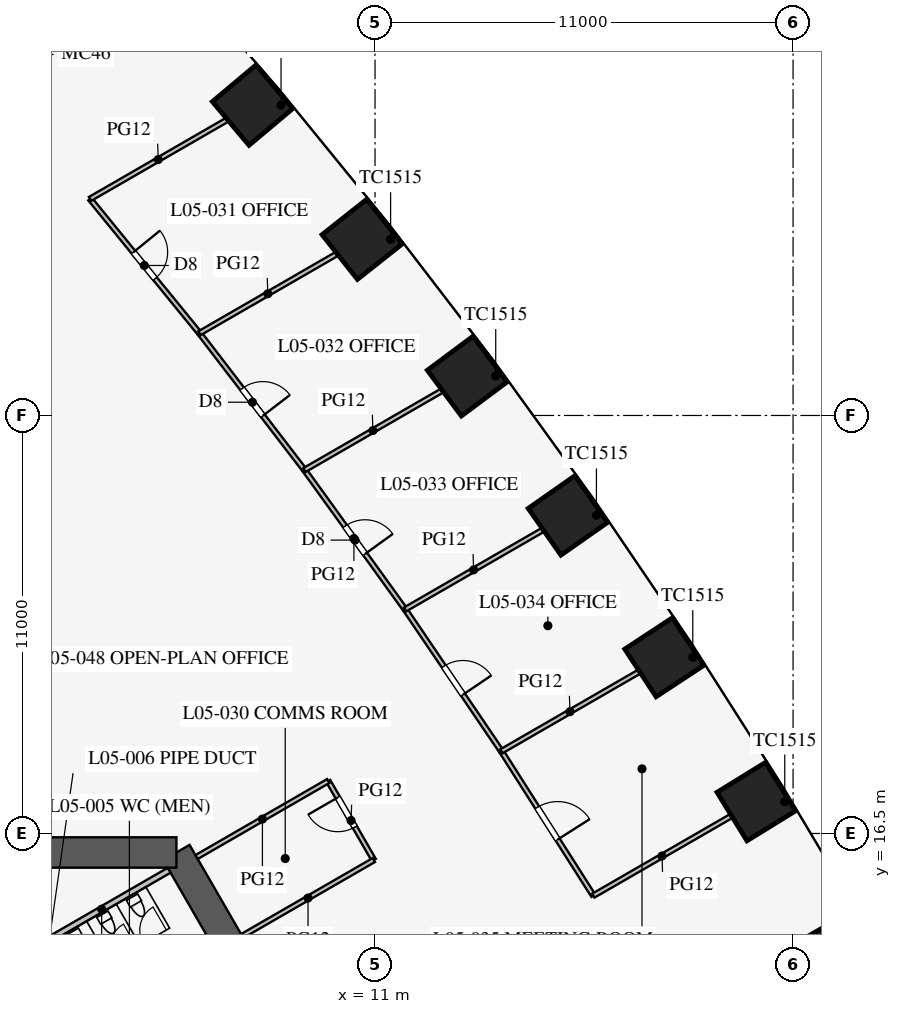
"""IFC4 building model, lengths in metres.
Left out: names, types, materials, properties, quantities, classifications, styles, units other than length and angle.
Written with IfcOpenShell. Run it as: python <this file> out.ifc"""

import sys

from ifc_helpers import new_model, si_unit, direction, frame, frame_2d, origin, origin_2d, place, context, subcontext, project, spatial, rectangle, extrude, element, fill, save


model = new_model("IFC4")
c1 = context("Model", 3, precision=1e-05, world=origin(), true_north=direction((0.0, 1.0)))
c2 = subcontext(c1, "Body", "Model", "MODEL_VIEW")
j1 = project(units=[si_unit("LENGTHUNIT", "METRE"), si_unit("PLANEANGLEUNIT", "RADIAN")], contexts=[c1])
p1 = place(None, origin())
s1 = spatial("IfcSite", under=j1, at=p1, CompositionType="ELEMENT")
p2 = place(p1, origin())
s2 = spatial("IfcBuilding", under=s1, at=p2, CompositionType="ELEMENT")
p3 = place(p2, frame((0.0, 0.0, 24.9)))
s3 = spatial("IfcBuildingStorey", under=s2, at=p3, CompositionType="ELEMENT", Elevation=24.9)
for number, where, z_axis, x_axis in (
    (1, (23.338, 13.474, 0.0), (0.0, 0.0, 1.0), (-0.5, 0.866, 0.0)),
    (2, (21.031, 17.339, 0.0), (0.0, 0.0, 1.0), (-0.525, 0.851, 0.0)),
    (3, (18.611, 21.137, 0.0), (0.0, 0.0, 1.0), (-0.549, 0.836, 0.0)),
    (4, (16.076, 24.87, 0.0), (0.0, 0.0, 1.0), (-0.574, 0.819, 0.0)),
    (5, (13.426, 28.536, 0.0), (0.0, 0.0, 1.0), (-0.597, 0.802, 0.0)),
    (6, (10.66, 32.135, 0.0), (0.0, 0.0, 1.0), (-0.62, 0.784, 0.0)),
    (7, (7.776, 35.667, 0.0), (0.0, 0.0, 1.0), (-0.643, 0.766, 0.0)),
):
    element("IfcColumn", number, at=place(p3, frame(where, z_axis=z_axis, x_axis=x_axis)), inside=s3, PredefinedType="COLUMN", context=c2, shape_type="SweptSolid", body=[
        extrude(rectangle(XDim=1.5, YDim=1.5, at=origin_2d()), origin(), (0.0, 0.0, 1.0), 4.2),
    ])
p4 = place(p3, frame((16.743, -3.0, 0.0), z_axis=(0.0, 0.0, 1.0), x_axis=(-0.500002442456, 0.866023993627, 0.0)))
e8 = element("IfcWall", 8, at=p4, inside=s3, PredefinedType="SHEAR", context=c2, shape_type="SweptSolid", body=[
    extrude(rectangle(XDim=21.939, YDim=0.8, at=frame_2d((10.97, 0.0))), origin(), (0.0, 0.0, 1.0), 4.2),
])
p5 = place(p4, frame((17.27, 0.0, 0.0)))
e9 = element("IfcOpeningElement", 9, at=p5, cuts=e8, PredefinedType="OPENING", context=c2, shape_type="SweptSolid", body=[
    extrude(rectangle(XDim=1.2, YDim=2.1, at=frame_2d((0.6, 1.05))), frame((0.0, 0.41, 0.0), z_axis=(0.0, -1.0, 0.0), x_axis=(1.0, 0.0, 0.0)), (0.0, 0.0, 1.0), 0.82),
])
p6 = place(p4, frame((3.47, 0.0, 0.0)))
e10 = element("IfcOpeningElement", 10, at=p6, cuts=e8, PredefinedType="OPENING", context=c2, shape_type="SweptSolid", body=[
    extrude(rectangle(XDim=1.2, YDim=2.1, at=frame_2d((0.6, 1.05))), frame((0.0, 0.41, 0.0), z_axis=(0.0, -1.0, 0.0), x_axis=(1.0, 0.0, 0.0)), (0.0, 0.0, 1.0), 0.82),
])
p7 = place(p3, frame((5.773, 16.0, 0.0), z_axis=(0.0, 0.0, 1.0), x_axis=(-1.0, 0.0, 0.0)))
e11 = element("IfcWall", 11, at=p7, inside=s3, PredefinedType="SHEAR", context=c2, shape_type="SweptSolid", body=[
    extrude(rectangle(XDim=11.547, YDim=0.8, at=frame_2d((5.773, 0.0))), origin(), (0.0, 0.0, 1.0), 4.2),
])
p8 = place(p3, frame((2.031, 13.482, 0.0), z_axis=(0.0, 0.0, 1.0), x_axis=(0.866050731258, 0.499956128963, 0.0)))
e12 = element("IfcWall", 12, at=p8, inside=s3, PredefinedType="PARTITIONING", context=c2, shape_type="SweptSolid", body=[
    extrude(rectangle(XDim=4.1, YDim=0.15, at=frame_2d((2.05, 0.0))), origin(), (0.0, 0.0, 1.0), 4.0),
])
p9 = place(p3, frame((10.969, 15.802, 0.0), z_axis=(0.0, 0.0, 1.0), x_axis=(-0.500001309137, 0.866024647952, 0.0)))
e13 = element("IfcWall", 13, at=p9, inside=s3, PredefinedType="PARTITIONING", context=c2, shape_type="SweptSolid", body=[
    extrude(rectangle(XDim=2.4, YDim=0.12, at=frame_2d((1.2, 0.0))), origin(), (0.0, 0.0, 1.0), 2.9),
])
p10 = place(p9, frame((1.0, 0.0, 0.15)))
e14 = element("IfcOpeningElement", 14, at=p10, cuts=e13, PredefinedType="OPENING", context=c2, shape_type="SweptSolid", body=[
    extrude(rectangle(XDim=0.9, YDim=2.1, at=frame_2d((0.45, 1.05))), frame((0.0, 0.07, 0.0), z_axis=(0.0, -1.0, 0.0), x_axis=(1.0, 0.0, 0.0)), (0.0, 0.0, 1.0), 0.14),
])
for number, where, z_axis, x_axis in (
    (15, (6.305, 15.88, 0.0), (0.0, 0.0, 1.0), (0.866, 0.5, 0.0)),
    (16, (7.505, 13.802, 0.0), (0.0, 0.0, 1.0), (0.866, 0.5, 0.0)),
):
    element("IfcWall", number, at=place(p3, frame(where, z_axis=z_axis, x_axis=x_axis)), inside=s3, PredefinedType="PARTITIONING", context=c2, shape_type="SweptSolid", body=[
        extrude(rectangle(XDim=4.0, YDim=0.12, at=frame_2d((2.0, 0.0))), origin(), (0.0, 0.0, 1.0), 2.9),
    ])
p11 = place(p3, frame((11.792, 22.396, 0.0), z_axis=(0.0, 0.0, 1.0), x_axis=(-0.585376255171, 0.810761765183, 0.0)))
e17 = element("IfcWall", 17, at=p11, inside=s3, PredefinedType="PARTITIONING", context=c2, shape_type="SweptSolid", body=[
    extrude(rectangle(XDim=4.523, YDim=0.12, at=frame_2d((2.262, 0.0))), origin(), (0.0, 0.0, 1.0), 2.9),
])
p12 = place(p11, frame((1.8, 0.0, 0.15)))
e18 = element("IfcOpeningElement", 18, at=p12, cuts=e17, PredefinedType="OPENING", context=c2, shape_type="SweptSolid", body=[
    extrude(rectangle(XDim=0.9, YDim=2.1, at=frame_2d((0.45, 1.05))), frame((0.0, 0.07, 0.0), z_axis=(0.0, -1.0, 0.0), x_axis=(1.0, 0.0, 0.0)), (0.0, 0.0, 1.0), 0.14),
])
p13 = place(p3, frame((9.144, 26.064, 0.0), z_axis=(0.0, 0.0, 1.0), x_axis=(-0.608818785139, 0.79330932609, 0.0)))
e19 = element("IfcWall", 19, at=p13, inside=s3, PredefinedType="PARTITIONING", context=c2, shape_type="SweptSolid", body=[
    extrude(rectangle(XDim=4.539, YDim=0.12, at=frame_2d((2.27, 0.0))), origin(), (0.0, 0.0, 1.0), 2.9),
])
p14 = place(p13, frame((1.8, 0.0, 0.15)))
e20 = element("IfcOpeningElement", 20, at=p14, cuts=e19, PredefinedType="OPENING", context=c2, shape_type="SweptSolid", body=[
    extrude(rectangle(XDim=0.9, YDim=2.1, at=frame_2d((0.45, 1.05))), frame((0.0, 0.07, 0.0), z_axis=(0.0, -1.0, 0.0), x_axis=(1.0, 0.0, 0.0)), (0.0, 0.0, 1.0), 0.14),
])
p15 = place(p3, frame((6.38, 29.665, 0.0), z_axis=(0.0, 0.0, 1.0), x_axis=(-0.631801700012, 0.775130061256, 0.0)))
e21 = element("IfcWall", 21, at=p15, inside=s3, PredefinedType="PARTITIONING", context=c2, shape_type="SweptSolid", body=[
    extrude(rectangle(XDim=4.558, YDim=0.12, at=frame_2d((2.279, 0.0))), origin(), (0.0, 0.0, 1.0), 2.9),
])
p16 = place(p15, frame((1.85, 0.0, 0.15)))
e22 = element("IfcOpeningElement", 22, at=p16, cuts=e21, PredefinedType="OPENING", context=c2, shape_type="SweptSolid", body=[
    extrude(rectangle(XDim=0.9, YDim=2.1, at=frame_2d((0.45, 1.05))), frame((0.0, 0.07, 0.0), z_axis=(0.0, -1.0, 0.0), x_axis=(1.0, 0.0, 0.0)), (0.0, 0.0, 1.0), 0.14),
])
p17 = place(p3, frame((16.745, 14.864, 0.0), z_axis=(0.0, 0.0, 1.0), x_axis=(-0.537205132487, 0.843451626135, 0.0)))
e23 = element("IfcWall", 23, at=p17, inside=s3, PredefinedType="PARTITIONING", context=c2, shape_type="SweptSolid", body=[
    extrude(rectangle(XDim=4.504, YDim=0.12, at=frame_2d((2.252, 0.0))), origin(), (0.0, 0.0, 1.0), 2.9),
])
p18 = place(p17, frame((1.75, 0.0, 0.15)))
e24 = element("IfcOpeningElement", 24, at=p18, cuts=e23, PredefinedType="OPENING", context=c2, shape_type="SweptSolid", body=[
    extrude(rectangle(XDim=1.0, YDim=2.1, at=frame_2d((0.5, 1.05))), frame((0.0, 0.07, 0.0), z_axis=(0.0, -1.0, 0.0), x_axis=(1.0, 0.0, 0.0)), (0.0, 0.0, 1.0), 0.14),
])
p19 = place(p3, frame((14.325, 18.663, 0.0), z_axis=(0.0, 0.0, 1.0), x_axis=(-0.561512004239, 0.827468591002, 0.0)))
e25 = element("IfcWall", 25, at=p19, inside=s3, PredefinedType="PARTITIONING", context=c2, shape_type="SweptSolid", body=[
    extrude(rectangle(XDim=4.512, YDim=0.12, at=frame_2d((2.256, 0.0))), origin(), (0.0, 0.0, 1.0), 2.9),
])
p20 = place(p19, frame((1.8, 0.0, 0.15)))
e26 = element("IfcOpeningElement", 26, at=p20, cuts=e25, PredefinedType="OPENING", context=c2, shape_type="SweptSolid", body=[
    extrude(rectangle(XDim=0.9, YDim=2.1, at=frame_2d((0.45, 1.05))), frame((0.0, 0.07, 0.0), z_axis=(0.0, -1.0, 0.0), x_axis=(1.0, 0.0, 0.0)), (0.0, 0.0, 1.0), 0.14),
])
p21 = place(p3, frame((11.792, 22.396, 0.0), z_axis=(0.0, 0.0, 1.0), x_axis=(0.866011781705, 0.500023593391, 0.0)))
e27 = element("IfcWall", 27, at=p21, inside=s3, PredefinedType="PARTITIONING", context=c2, shape_type="SweptSolid", body=[
    extrude(rectangle(XDim=4.164, YDim=0.12, at=frame_2d((2.082, 0.0))), origin(), (0.0, 0.0, 1.0), 2.9),
])
p22 = place(p3, frame((9.144, 26.064, 0.0), z_axis=(0.0, 0.0, 1.0), x_axis=(0.866031144707, 0.499990056298, 0.0)))
e28 = element("IfcWall", 28, at=p22, inside=s3, PredefinedType="PARTITIONING", context=c2, shape_type="SweptSolid", body=[
    extrude(rectangle(XDim=4.159, YDim=0.12, at=frame_2d((2.08, 0.0))), origin(), (0.0, 0.0, 1.0), 2.9),
])
p23 = place(p3, frame((6.38, 29.665, 0.0), z_axis=(0.0, 0.0, 1.0), x_axis=(0.866027987673, 0.499995524547, 0.0)))
e29 = element("IfcWall", 29, at=p23, inside=s3, PredefinedType="PARTITIONING", context=c2, shape_type="SweptSolid", body=[
    extrude(rectangle(XDim=4.153, YDim=0.12, at=frame_2d((2.077, 0.0))), origin(), (0.0, 0.0, 1.0), 2.9),
])
p24 = place(p3, frame((3.5, 33.198, 0.0), z_axis=(0.0, 0.0, 1.0), x_axis=(0.865998262296, 0.500047007491, 0.0)))
e30 = element("IfcWall", 30, at=p24, inside=s3, PredefinedType="PARTITIONING", context=c2, shape_type="SweptSolid", body=[
    extrude(rectangle(XDim=4.146, YDim=0.12, at=frame_2d((2.073, 0.0))), origin(), (0.0, 0.0, 1.0), 2.9),
])
p25 = place(p3, frame((16.745, 14.864, 0.0), z_axis=(0.0, 0.0, 1.0), x_axis=(0.866025669538, 0.499999539701, 0.0)))
e31 = element("IfcWall", 31, at=p25, inside=s3, PredefinedType="PARTITIONING", context=c2, shape_type="SweptSolid", body=[
    extrude(rectangle(XDim=4.169, YDim=0.12, at=frame_2d((2.085, 0.0))), origin(), (0.0, 0.0, 1.0), 2.9),
])
p26 = place(p3, frame((14.325, 18.663, 0.0), z_axis=(0.0, 0.0, 1.0), x_axis=(0.866009971343, 0.50002672882, 0.0)))
e32 = element("IfcWall", 32, at=p26, inside=s3, PredefinedType="PARTITIONING", context=c2, shape_type="SweptSolid", body=[
    extrude(rectangle(XDim=4.167, YDim=0.12, at=frame_2d((2.083, 0.0))), origin(), (0.0, 0.0, 1.0), 2.9),
])
p27 = place(p10, origin())
e33 = element("IfcDoor", 33, at=p27, inside=s3, OperationType="SINGLE_SWING_RIGHT", PredefinedType="DOOR", context=c2, shape_type="SweptSolid", body=[
    extrude(rectangle(XDim=0.9, YDim=2.1, at=frame_2d((0.45, 1.05))), frame((0.0, 0.025, 0.0), z_axis=(0.0, -1.0, 0.0), x_axis=(1.0, 0.0, 0.0)), (0.0, 0.0, 1.0), 0.05),
])
fill(e14, e33)
p28 = place(p16, frame((0.9, 0.0, 0.0), z_axis=(0.0, 0.0, 1.0), x_axis=(-1.0, 0.0, 0.0)))
e34 = element("IfcDoor", 34, at=p28, inside=s3, OperationType="SINGLE_SWING_LEFT", PredefinedType="DOOR", context=c2, shape_type="SweptSolid", body=[
    extrude(rectangle(XDim=0.9, YDim=2.1, at=frame_2d((0.45, 1.05))), frame((0.0, 0.025, 0.0), z_axis=(0.0, -1.0, 0.0), x_axis=(1.0, 0.0, 0.0)), (0.0, 0.0, 1.0), 0.05),
])
fill(e22, e34)
p29 = place(p14, frame((0.9, 0.0, 0.0), z_axis=(0.0, 0.0, 1.0), x_axis=(-1.0, 0.0, 0.0)))
e35 = element("IfcDoor", 35, at=p29, inside=s3, OperationType="SINGLE_SWING_RIGHT", PredefinedType="DOOR", context=c2, shape_type="SweptSolid", body=[
    extrude(rectangle(XDim=0.9, YDim=2.1, at=frame_2d((0.45, 1.05))), frame((0.0, 0.025, 0.0), z_axis=(0.0, -1.0, 0.0), x_axis=(1.0, 0.0, 0.0)), (0.0, 0.0, 1.0), 0.05),
])
fill(e20, e35)
p30 = place(p12, frame((0.9, 0.0, 0.0), z_axis=(0.0, 0.0, 1.0), x_axis=(-1.0, 0.0, 0.0)))
e36 = element("IfcDoor", 36, at=p30, inside=s3, OperationType="SINGLE_SWING_RIGHT", PredefinedType="DOOR", context=c2, shape_type="SweptSolid", body=[
    extrude(rectangle(XDim=0.9, YDim=2.1, at=frame_2d((0.45, 1.05))), frame((0.0, 0.025, 0.0), z_axis=(0.0, -1.0, 0.0), x_axis=(1.0, 0.0, 0.0)), (0.0, 0.0, 1.0), 0.05),
])
fill(e18, e36)
p31 = place(p20, frame((0.9, 0.0, 0.0), z_axis=(0.0, 0.0, 1.0), x_axis=(-1.0, 0.0, 0.0)))
e37 = element("IfcDoor", 37, at=p31, inside=s3, OperationType="SINGLE_SWING_RIGHT", PredefinedType="DOOR", context=c2, shape_type="SweptSolid", body=[
    extrude(rectangle(XDim=0.9, YDim=2.1, at=frame_2d((0.45, 1.05))), frame((0.0, 0.025, 0.0), z_axis=(0.0, -1.0, 0.0), x_axis=(1.0, 0.0, 0.0)), (0.0, 0.0, 1.0), 0.05),
])
fill(e26, e37)
p32 = place(p18, frame((1.0, 0.0, 0.0), z_axis=(0.0, 0.0, 1.0), x_axis=(-1.0, 0.0, 0.0)))
e38 = element("IfcDoor", 38, at=p32, inside=s3, OperationType="SINGLE_SWING_RIGHT", PredefinedType="DOOR", context=c2, shape_type="SweptSolid", body=[
    extrude(rectangle(XDim=1.0, YDim=2.1, at=frame_2d((0.5, 1.05))), frame((0.0, 0.025, 0.0), z_axis=(0.0, -1.0, 0.0), x_axis=(1.0, 0.0, 0.0)), (0.0, 0.0, 1.0), 0.05),
])
fill(e24, e38)
save(model, sys.argv[1])
